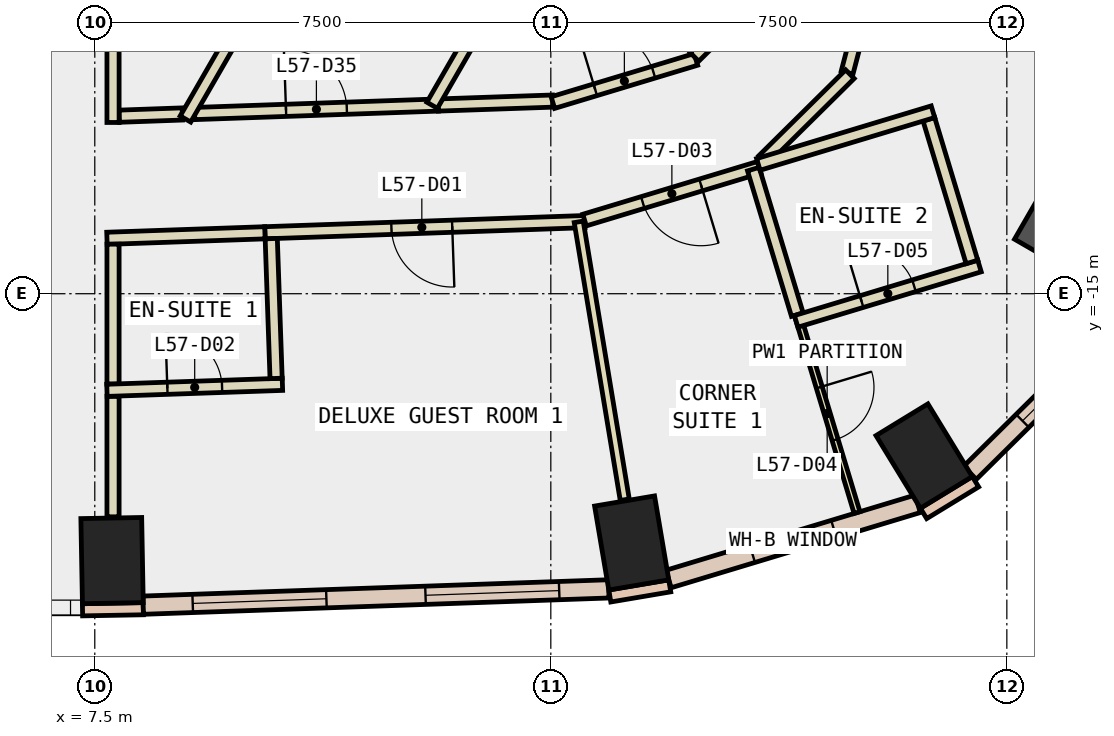
"""IFC4 building model, lengths in metres.
Left out: names, types, materials, properties, quantities, classifications, styles, units other than length and angle.
Written with IfcOpenShell. Run it as: python <this file> out.ifc"""

import sys

from ifc_helpers import new_model, si_unit, direction, frame, frame_2d, origin, origin_2d, place, context, subcontext, project, spatial, rectangle, extrude, element, fill, save


model = new_model("IFC4")
c1 = context("Model", 3, precision=1e-05, world=origin(), true_north=direction((0.0, 1.0)))
c2 = subcontext(c1, "Body", "Model", "MODEL_VIEW")
j1 = project(units=[si_unit("LENGTHUNIT", "METRE"), si_unit("PLANEANGLEUNIT", "RADIAN")], contexts=[c1])
p1 = place(None, origin())
s1 = spatial("IfcSite", under=j1, at=p1, CompositionType="ELEMENT")
p2 = place(p1, origin())
s2 = spatial("IfcBuilding", under=s1, at=p2, CompositionType="ELEMENT")
p3 = place(p2, frame((0.0, 0.0, 252.2)))
s3 = spatial("IfcBuildingStorey", under=s2, at=p3, CompositionType="ELEMENT", Elevation=252.2)
for number, where, z_axis, x_axis in (
    (1, (7.784, -19.389, -0.34), (0.0, 0.0, 1.0), (1.0, 0.018, 0.0)),
    (2, (16.33, -19.099, -0.34), (0.0, 0.0, 1.0), (0.986, 0.167, 0.0)),
    (3, (21.14, -17.67, -0.34), (0.0, 0.0, 1.0), (0.853, 0.521, 0.0)),
):
    element("IfcColumn", number, at=place(p3, frame(where, z_axis=z_axis, x_axis=x_axis)), inside=s3, PredefinedType="COLUMN", context=c2, shape_type="SweptSolid", body=[
        extrude(rectangle(XDim=1.0, YDim=1.4, at=origin_2d()), origin(), (0.0, 0.0, 1.0), 3.6),
    ])
p4 = place(p3, frame((23.856, -13.774, -0.34), z_axis=(0.0, 0.0, 1.0), x_axis=(-0.866025403784, 0.5, 0.0)))
e4 = element("IfcColumn", 4, at=p4, inside=s3, PredefinedType="COLUMN", context=c2, shape_type="SweptSolid", body=[
    extrude(rectangle(XDim=1.8, YDim=1.8, at=origin_2d()), origin(), (0.0, 0.0, 1.0), 3.6),
])
for number, where, z_axis, x_axis in (
    (5, (7.298, -20.198, 0.0), (0.0, 0.0, 1.0), (1.0, 0.018, 0.0)),
    (6, (15.97, -19.971, 0.0), (0.0, 0.0, 1.0), (0.986, 0.167, 0.0)),
):
    element("IfcWall", number, at=place(p3, frame(where, z_axis=z_axis, x_axis=x_axis)), inside=s3, PredefinedType="STANDARD", context=c2, shape_type="SweptSolid", body=[
        extrude(rectangle(XDim=1.0, YDim=0.2, at=frame_2d((0.5, 0.0))), origin(), (0.0, 0.0, 1.0), 3.26),
    ])
p5 = place(p3, frame((21.13, -18.613, 0.0), z_axis=(0.0, 0.0, 1.0), x_axis=(0.853679739553, 0.520798331677, 0.0)))
e7 = element("IfcWall", 7, at=p5, inside=s3, PredefinedType="STANDARD", context=c2, shape_type="SweptSolid", body=[
    extrude(rectangle(XDim=1.0, YDim=0.2, at=frame_2d((0.5, 0.0))), origin(), (0.0, 0.0, 1.0), 3.26),
])
p6 = place(p3, frame((8.296, -20.122, 0.0), z_axis=(0.0, 0.0, 1.0), x_axis=(0.999387577449, 0.034992428331, 0.0)))
e8 = element("IfcWall", 8, at=p6, inside=s3, PredefinedType="STANDARD", context=c2, shape_type="SweptSolid", body=[
    extrude(rectangle(XDim=7.661, YDim=0.3, at=frame_2d((3.83, 0.0))), origin(), (0.0, 0.0, 1.0), 3.26),
])
p7 = place(p6, frame((0.815, 0.0, 0.9)))
e9 = element("IfcOpeningElement", 9, at=p7, cuts=e8, PredefinedType="OPENING", context=c2, shape_type="SweptSolid", body=[
    extrude(rectangle(XDim=2.2, YDim=2.0, at=frame_2d((1.1, 1.0))), frame((0.0, 0.16, 0.0), z_axis=(0.0, -1.0, 0.0), x_axis=(1.0, 0.0, 0.0)), (0.0, 0.0, 1.0), 0.32),
])
p8 = place(p6, frame((4.646, 0.0, 0.9)))
e10 = element("IfcOpeningElement", 10, at=p8, cuts=e8, PredefinedType="OPENING", context=c2, shape_type="SweptSolid", body=[
    extrude(rectangle(XDim=2.2, YDim=2.0, at=frame_2d((1.1, 1.0))), frame((0.0, 0.16, 0.0), z_axis=(0.0, -1.0, 0.0), x_axis=(1.0, 0.0, 0.0)), (0.0, 0.0, 1.0), 0.32),
])
p9 = place(p3, frame((16.936, -19.692, 0.0), z_axis=(0.0, 0.0, 1.0), x_axis=(0.957346168713, 0.288943442997, 0.0)))
e11 = element("IfcWall", 11, at=p9, inside=s3, PredefinedType="STANDARD", context=c2, shape_type="SweptSolid", body=[
    extrude(rectangle(XDim=4.281, YDim=0.3, at=frame_2d((2.14, 0.0))), origin(), (0.0, 0.0, 1.0), 3.26),
])
p10 = place(p9, frame((1.44, 0.0, 0.9)))
e12 = element("IfcOpeningElement", 12, at=p10, cuts=e11, PredefinedType="OPENING", context=c2, shape_type="SweptSolid", body=[
    extrude(rectangle(XDim=1.4, YDim=2.0, at=frame_2d((0.7, 1.0))), frame((0.0, 0.16, 0.0), z_axis=(0.0, -1.0, 0.0), x_axis=(1.0, 0.0, 0.0)), (0.0, 0.0, 1.0), 0.32),
])
p11 = place(p3, frame((21.893, -17.946, 0.0), z_axis=(0.0, 0.0, 1.0), x_axis=(0.71110935557, 0.703081420904, 0.0)))
e13 = element("IfcWall", 13, at=p11, inside=s3, PredefinedType="STANDARD", context=c2, shape_type="SweptSolid", body=[
    extrude(rectangle(XDim=3.832, YDim=0.3, at=frame_2d((1.916, 0.0))), origin(), (0.0, 0.0, 1.0), 3.26),
])
p12 = place(p11, frame((1.216, 0.0, 0.9)))
e14 = element("IfcOpeningElement", 14, at=p12, cuts=e13, PredefinedType="OPENING", context=c2, shape_type="SweptSolid", body=[
    extrude(rectangle(XDim=1.4, YDim=2.0, at=frame_2d((0.7, 1.0))), frame((0.0, 0.16, 0.0), z_axis=(0.0, -1.0, 0.0), x_axis=(1.0, 0.0, 0.0)), (0.0, 0.0, 1.0), 0.32),
])
p13 = place(p3, frame((7.9, -12.081, 0.0), z_axis=(0.0, 0.0, 1.0), x_axis=(0.999365240621, 0.035624652105, 0.0)))
e15 = element("IfcWall", 15, at=p13, inside=s3, PredefinedType="PARTITIONING", context=c2, shape_type="SweptSolid", body=[
    extrude(rectangle(XDim=1.042, YDim=0.2, at=frame_2d((0.521, 0.0))), origin(), (0.0, 0.0, 1.0), 3.26),
])
p14 = place(p3, frame((9.141, -12.037, 0.0), z_axis=(0.0, 0.0, 1.0), x_axis=(0.999388955878, 0.034953038062, 0.0)))
e16 = element("IfcWall", 16, at=p14, inside=s3, PredefinedType="PARTITIONING", context=c2, shape_type="SweptSolid", body=[
    extrude(rectangle(XDim=4.009, YDim=0.2, at=frame_2d((2.005, 0.0))), origin(), (0.0, 0.0, 1.0), 3.26),
])
p15 = place(p14, frame((1.505, 0.0, 0.0)))
e17 = element("IfcOpeningElement", 17, at=p15, cuts=e16, PredefinedType="OPENING", context=c2, shape_type="SweptSolid", body=[
    extrude(rectangle(XDim=1.0, YDim=2.1, at=frame_2d((0.5, 1.05))), frame((0.0, 0.11, 0.0), z_axis=(0.0, -1.0, 0.0), x_axis=(1.0, 0.0, 0.0)), (0.0, 0.0, 1.0), 0.22),
])
p16 = place(p3, frame((13.148, -11.897, 0.0), z_axis=(0.0, 0.0, 1.0), x_axis=(0.999405229262, 0.034484601243, 0.0)))
e18 = element("IfcWall", 18, at=p16, inside=s3, PredefinedType="PARTITIONING", context=c2, shape_type="SweptSolid", body=[
    extrude(rectangle(XDim=1.883, YDim=0.2, at=frame_2d((0.942, 0.0))), origin(), (0.0, 0.0, 1.0), 3.26),
])
p17 = place(p3, frame((15.034, -11.857, 0.0), z_axis=(0.0, 0.0, 1.0), x_axis=(0.957338084933, 0.288970225346, 0.0)))
e19 = element("IfcWall", 19, at=p17, inside=s3, PredefinedType="PARTITIONING", context=c2, shape_type="SweptSolid", body=[
    extrude(rectangle(XDim=2.457, YDim=0.2, at=frame_2d((1.229, 0.0))), origin(), (0.0, 0.0, 1.0), 3.26),
])
p18 = place(p17, frame((0.728, 0.0, 0.0)))
e20 = element("IfcOpeningElement", 20, at=p18, cuts=e19, PredefinedType="OPENING", context=c2, shape_type="SweptSolid", body=[
    extrude(rectangle(XDim=1.0, YDim=2.1, at=frame_2d((0.5, 1.05))), frame((0.0, 0.11, 0.0), z_axis=(0.0, -1.0, 0.0), x_axis=(1.0, 0.0, 0.0)), (0.0, 0.0, 1.0), 0.22),
])
p19 = place(p3, frame((17.362, -11.106, 0.0), z_axis=(0.0, 0.0, 1.0), x_axis=(0.710859741153, 0.703333795866, 0.0)))
e21 = element("IfcWall", 21, at=p19, inside=s3, PredefinedType="PARTITIONING", context=c2, shape_type="SweptSolid", body=[
    extrude(rectangle(XDim=1.071, YDim=0.2, at=frame_2d((0.535, 0.0))), origin(), (0.0, 0.0, 1.0), 3.26),
])
p20 = place(p3, frame((15.559, -13.814, 0.0), z_axis=(0.0, 0.0, 1.0), x_axis=(-0.999388410674, -0.034968623214, 0.0)))
e22 = element("IfcWall", 22, at=p20, inside=s3, PredefinedType="PARTITIONING", context=c2, shape_type="SweptSolid", body=[
    extrude(rectangle(XDim=5.264, YDim=0.2, at=frame_2d((2.632, 0.0))), origin(), (0.0, 0.0, 1.0), 3.26),
])
p21 = place(p20, frame((2.182, 0.0, 0.0)))
e23 = element("IfcOpeningElement", 23, at=p21, cuts=e22, PredefinedType="OPENING", context=c2, shape_type="SweptSolid", body=[
    extrude(rectangle(XDim=1.0, YDim=2.1, at=frame_2d((0.5, 1.05))), frame((0.0, 0.11, 0.0), z_axis=(0.0, -1.0, 0.0), x_axis=(1.0, 0.0, 0.0)), (0.0, 0.0, 1.0), 0.22),
])
p22 = place(p3, frame((10.298, -13.998, 0.0), z_axis=(0.0, 0.0, 1.0), x_axis=(-0.999386321032, -0.035028293342, 0.0)))
e24 = element("IfcWall", 24, at=p22, inside=s3, PredefinedType="PARTITIONING", context=c2, shape_type="SweptSolid", body=[
    extrude(rectangle(XDim=2.6, YDim=0.2, at=frame_2d((1.3, 0.0))), origin(), (0.0, 0.0, 1.0), 3.26),
])
p23 = place(p3, frame((18.427, -12.922, 0.0), z_axis=(0.0, 0.0, 1.0), x_axis=(-0.957336631432, -0.288975040651, 0.0)))
e25 = element("IfcWall", 25, at=p23, inside=s3, PredefinedType="PARTITIONING", context=c2, shape_type="SweptSolid", body=[
    extrude(rectangle(XDim=3.0, YDim=0.2, at=frame_2d((1.5, 0.0))), origin(), (0.0, 0.0, 1.0), 3.26),
])
p24 = place(p23, frame((1.0, 0.0, 0.0)))
e26 = element("IfcOpeningElement", 26, at=p24, cuts=e25, PredefinedType="OPENING", context=c2, shape_type="SweptSolid", body=[
    extrude(rectangle(XDim=1.0, YDim=2.1, at=frame_2d((0.5, 1.05))), frame((0.0, 0.11, 0.0), z_axis=(0.0, -1.0, 0.0), x_axis=(1.0, 0.0, 0.0)), (0.0, 0.0, 1.0), 0.22),
])
p25 = place(p3, frame((20.327, -9.629, 0.0), z_axis=(0.0, 0.0, 1.0), x_axis=(-0.253192482031, -0.967415922467, 0.0)))
e27 = element("IfcWall", 27, at=p25, inside=s3, PredefinedType="PARTITIONING", context=c2, shape_type="SweptSolid", body=[
    extrude(rectangle(XDim=1.792, YDim=0.2, at=frame_2d((0.896, 0.0))), origin(), (0.0, 0.0, 1.0), 3.26),
])
p26 = place(p3, frame((19.919, -11.39, 0.0), z_axis=(0.0, 0.0, 1.0), x_axis=(-0.71104667794, -0.70314480855, 0.0)))
e28 = element("IfcWall", 28, at=p26, inside=s3, PredefinedType="PARTITIONING", context=c2, shape_type="SweptSolid", body=[
    extrude(rectangle(XDim=2.008, YDim=0.2, at=frame_2d((1.004, 0.0))), origin(), (0.0, 0.0, 1.0), 3.26),
])
p27 = place(p3, frame((7.8, -7.499, 0.0), z_axis=(0.0, 0.0, 1.0), x_axis=(0.0, -1.0, 0.0)))
e29 = element("IfcWall", 29, at=p27, inside=s3, PredefinedType="PARTITIONING", context=c2, shape_type="SweptSolid", body=[
    extrude(rectangle(XDim=4.685, YDim=0.2, at=frame_2d((2.343, 0.0))), origin(), (0.0, 0.0, 1.0), 3.26),
])
p28 = place(p27, frame((1.842, 0.0, 0.0)))
e30 = element("IfcOpeningElement", 30, at=p28, cuts=e29, PredefinedType="OPENING", context=c2, shape_type="SweptSolid", body=[
    extrude(rectangle(XDim=1.0, YDim=2.1, at=frame_2d((0.5, 1.05))), frame((0.0, 0.11, 0.0), z_axis=(0.0, -1.0, 0.0), x_axis=(1.0, 0.0, 0.0)), (0.0, 0.0, 1.0), 0.22),
])
p29 = place(p3, frame((7.8, -16.686, 0.0), z_axis=(0.0, 0.0, 1.0), x_axis=(0.0, -1.0, 0.0)))
e31 = element("IfcWall", 31, at=p29, inside=s3, PredefinedType="PARTITIONING", context=c2, shape_type="SweptSolid", body=[
    extrude(rectangle(XDim=1.983, YDim=0.2, at=frame_2d((0.991, 0.0))), origin(), (0.0, 0.0, 1.0), 3.26),
])
p30 = place(p3, frame((7.8, -14.185, 0.0), z_axis=(0.0, 0.0, 1.0), x_axis=(0.0, -1.0, 0.0)))
e32 = element("IfcWall", 32, at=p30, inside=s3, PredefinedType="PARTITIONING", context=c2, shape_type="SweptSolid", body=[
    extrude(rectangle(XDim=2.301, YDim=0.2, at=frame_2d((1.15, 0.0))), origin(), (0.0, 0.0, 1.0), 3.26),
])
p31 = place(p3, frame((11.794, -7.271, 0.0), z_axis=(0.0, 0.0, 1.0), x_axis=(-0.499918457185, -0.866072477433, 0.0)))
e33 = element("IfcWall", 33, at=p31, inside=s3, PredefinedType="PARTITIONING", context=c2, shape_type="SweptSolid", body=[
    extrude(rectangle(XDim=5.607, YDim=0.2, at=frame_2d((2.803, 0.0))), origin(), (0.0, 0.0, 1.0), 3.26),
])
p32 = place(p3, frame((14.739, -8.972, 0.0), z_axis=(0.0, 0.0, 1.0), x_axis=(-0.499974489635, -0.8660401317, 0.0)))
e34 = element("IfcWall", 34, at=p32, inside=s3, PredefinedType="PARTITIONING", context=c2, shape_type="SweptSolid", body=[
    extrude(rectangle(XDim=3.382, YDim=0.2, at=frame_2d((1.691, 0.0))), origin(), (0.0, 0.0, 1.0), 3.26),
])
p33 = place(p3, frame((7.7, -16.589, 0.0), z_axis=(0.0, 0.0, 1.0), x_axis=(0.999410709261, 0.034325416459, 0.0)))
e35 = element("IfcWall", 35, at=p33, inside=s3, PredefinedType="PARTITIONING", context=c2, shape_type="SweptSolid", body=[
    extrude(rectangle(XDim=2.888, YDim=0.2, at=frame_2d((1.444, 0.0))), origin(), (0.0, 0.0, 1.0), 3.26),
])
p34 = place(p33, frame((0.994, 0.0, 0.0)))
e36 = element("IfcOpeningElement", 36, at=p34, cuts=e35, PredefinedType="OPENING", context=c2, shape_type="SweptSolid", body=[
    extrude(rectangle(XDim=0.9, YDim=2.1, at=frame_2d((0.45, 1.05))), frame((0.0, 0.11, 0.0), z_axis=(0.0, -1.0, 0.0), x_axis=(1.0, 0.0, 0.0)), (0.0, 0.0, 1.0), 0.22),
])
p35 = place(p3, frame((10.482, -16.393, 0.0), z_axis=(0.0, 0.0, 1.0), x_axis=(-0.034703518322, 0.999397651496, 0.0)))
e37 = element("IfcWall", 37, at=p35, inside=s3, PredefinedType="PARTITIONING", context=c2, shape_type="SweptSolid", body=[
    extrude(rectangle(XDim=2.301, YDim=0.2, at=frame_2d((1.15, 0.0))), origin(), (0.0, 0.0, 1.0), 3.26),
])
p36 = place(p3, frame((15.459, -13.818, 0.0), z_axis=(0.0, 0.0, 1.0), x_axis=(0.163441652939, -0.986553002167, 0.0)))
e38 = element("IfcWall", 38, at=p36, inside=s3, PredefinedType="PARTITIONING", context=c2, shape_type="SweptSolid", body=[
    extrude(rectangle(XDim=4.632, YDim=0.15, at=frame_2d((2.316, 0.0))), origin(), (0.0, 0.0, 1.0), 3.26),
])
p37 = place(p3, frame((19.054, -15.344, 0.0), z_axis=(0.0, 0.0, 1.0), x_axis=(0.288803435252, -0.957388414274, 0.0)))
e39 = element("IfcWall", 39, at=p37, inside=s3, PredefinedType="PARTITIONING", context=c2, shape_type="SweptSolid", body=[
    extrude(rectangle(XDim=3.4, YDim=0.1, at=frame_2d((1.7, 0.0))), origin(), (0.0, 0.0, 1.0), 3.26),
])
p38 = place(p37, frame((1.25, 0.0, 0.0)))
e40 = element("IfcOpeningElement", 40, at=p38, cuts=e39, PredefinedType="OPENING", context=c2, shape_type="SweptSolid", body=[
    extrude(rectangle(XDim=0.9, YDim=2.1, at=frame_2d((0.45, 1.05))), frame((0.0, 0.06, 0.0), z_axis=(0.0, -1.0, 0.0), x_axis=(1.0, 0.0, 0.0)), (0.0, 0.0, 1.0), 0.12),
])
p39 = place(p3, frame((18.331, -12.951, 0.0), z_axis=(0.0, 0.0, 1.0), x_axis=(0.289175152117, -0.957276204341, 0.0)))
e41 = element("IfcWall", 41, at=p39, inside=s3, PredefinedType="PARTITIONING", context=c2, shape_type="SweptSolid", body=[
    extrude(rectangle(XDim=2.5, YDim=0.2, at=frame_2d((1.25, 0.0))), origin(), (0.0, 0.0, 1.0), 3.26),
])
p40 = place(p3, frame((19.035, -15.455, 0.0), z_axis=(0.0, 0.0, 1.0), x_axis=(0.957248369253, 0.28926728049, 0.0)))
e42 = element("IfcWall", 42, at=p40, inside=s3, PredefinedType="PARTITIONING", context=c2, shape_type="SweptSolid", body=[
    extrude(rectangle(XDim=3.15, YDim=0.2, at=frame_2d((1.575, 0.0))), origin(), (0.0, 0.0, 1.0), 3.26),
])
p41 = place(p40, frame((1.125, 0.0, 0.0)))
e43 = element("IfcOpeningElement", 43, at=p41, cuts=e42, PredefinedType="OPENING", context=c2, shape_type="SweptSolid", body=[
    extrude(rectangle(XDim=0.9, YDim=2.1, at=frame_2d((0.45, 1.05))), frame((0.0, 0.11, 0.0), z_axis=(0.0, -1.0, 0.0), x_axis=(1.0, 0.0, 0.0)), (0.0, 0.0, 1.0), 0.22),
])
p42 = place(p3, frame((21.926, -14.478, 0.0), z_axis=(0.0, 0.0, 1.0), x_axis=(-0.288928787246, 0.957350591947, 0.0)))
e44 = element("IfcWall", 44, at=p42, inside=s3, PredefinedType="PARTITIONING", context=c2, shape_type="SweptSolid", body=[
    extrude(rectangle(XDim=2.45, YDim=0.2, at=frame_2d((1.225, 0.0))), origin(), (0.0, 0.0, 1.0), 3.26),
])
p43 = place(p3, frame((21.285, -12.007, 0.0), z_axis=(0.0, 0.0, 1.0), x_axis=(-0.957329834998, -0.288997555392, 0.0)))
e45 = element("IfcWall", 45, at=p43, inside=s3, PredefinedType="PARTITIONING", context=c2, shape_type="SweptSolid", body=[
    extrude(rectangle(XDim=3.0, YDim=0.2, at=frame_2d((1.5, 0.0))), origin(), (0.0, 0.0, 1.0), 3.26),
])
p44 = place(p7, origin())
e46 = element("IfcWindow", 46, at=p44, inside=s3, PartitioningType="SINGLE_PANEL", PredefinedType="WINDOW", context=c2, shape_type="SweptSolid", body=[
    extrude(rectangle(XDim=2.2, YDim=2.0, at=frame_2d((1.1, 1.0))), frame((0.0, 0.03, 0.0), z_axis=(0.0, -1.0, 0.0), x_axis=(1.0, 0.0, 0.0)), (0.0, 0.0, 1.0), 0.06),
])
fill(e9, e46)
p45 = place(p8, origin())
e47 = element("IfcWindow", 47, at=p45, inside=s3, PartitioningType="SINGLE_PANEL", PredefinedType="WINDOW", context=c2, shape_type="SweptSolid", body=[
    extrude(rectangle(XDim=2.2, YDim=2.0, at=frame_2d((1.1, 1.0))), frame((0.0, 0.03, 0.0), z_axis=(0.0, -1.0, 0.0), x_axis=(1.0, 0.0, 0.0)), (0.0, 0.0, 1.0), 0.06),
])
fill(e10, e47)
p46 = place(p10, origin())
e48 = element("IfcWindow", 48, at=p46, inside=s3, PartitioningType="SINGLE_PANEL", PredefinedType="WINDOW", context=c2, shape_type="SweptSolid", body=[
    extrude(rectangle(XDim=1.4, YDim=2.0, at=frame_2d((0.7, 1.0))), frame((0.0, 0.03, 0.0), z_axis=(0.0, -1.0, 0.0), x_axis=(1.0, 0.0, 0.0)), (0.0, 0.0, 1.0), 0.06),
])
fill(e12, e48)
p47 = place(p12, origin())
e49 = element("IfcWindow", 49, at=p47, inside=s3, PartitioningType="SINGLE_PANEL", PredefinedType="WINDOW", context=c2, shape_type="SweptSolid", body=[
    extrude(rectangle(XDim=1.4, YDim=2.0, at=frame_2d((0.7, 1.0))), frame((0.0, 0.03, 0.0), z_axis=(0.0, -1.0, 0.0), x_axis=(1.0, 0.0, 0.0)), (0.0, 0.0, 1.0), 0.06),
])
fill(e14, e49)
p48 = place(p21, origin())
e50 = element("IfcDoor", 50, at=p48, inside=s3, OperationType="SINGLE_SWING_LEFT", PredefinedType="DOOR", context=c2, shape_type="SweptSolid", body=[
    extrude(rectangle(XDim=1.0, YDim=2.1, at=frame_2d((0.5, 1.05))), frame((0.0, 0.025, 0.0), z_axis=(0.0, -1.0, 0.0), x_axis=(1.0, 0.0, 0.0)), (0.0, 0.0, 1.0), 0.05),
])
fill(e23, e50)
p49 = place(p34, origin())
e51 = element("IfcDoor", 51, at=p49, inside=s3, OperationType="SINGLE_SWING_LEFT", PredefinedType="DOOR", context=c2, shape_type="SweptSolid", body=[
    extrude(rectangle(XDim=0.9, YDim=2.1, at=frame_2d((0.45, 1.05))), frame((0.0, 0.025, 0.0), z_axis=(0.0, -1.0, 0.0), x_axis=(1.0, 0.0, 0.0)), (0.0, 0.0, 1.0), 0.05),
])
fill(e36, e51)
p50 = place(p24, origin())
e52 = element("IfcDoor", 52, at=p50, inside=s3, OperationType="SINGLE_SWING_LEFT", PredefinedType="DOOR", context=c2, shape_type="SweptSolid", body=[
    extrude(rectangle(XDim=1.0, YDim=2.1, at=frame_2d((0.5, 1.05))), frame((0.0, 0.025, 0.0), z_axis=(0.0, -1.0, 0.0), x_axis=(1.0, 0.0, 0.0)), (0.0, 0.0, 1.0), 0.05),
])
fill(e26, e52)
p51 = place(p38, origin())
e53 = element("IfcDoor", 53, at=p51, inside=s3, OperationType="SINGLE_SWING_RIGHT", PredefinedType="DOOR", context=c2, shape_type="SweptSolid", body=[
    extrude(rectangle(XDim=0.9, YDim=2.1, at=frame_2d((0.45, 1.05))), frame((0.0, 0.025, 0.0), z_axis=(0.0, -1.0, 0.0), x_axis=(1.0, 0.0, 0.0)), (0.0, 0.0, 1.0), 0.05),
])
fill(e40, e53)
p52 = place(p41, origin())
e54 = element("IfcDoor", 54, at=p52, inside=s3, OperationType="SINGLE_SWING_LEFT", PredefinedType="DOOR", context=c2, shape_type="SweptSolid", body=[
    extrude(rectangle(XDim=0.9, YDim=2.1, at=frame_2d((0.45, 1.05))), frame((0.0, 0.025, 0.0), z_axis=(0.0, -1.0, 0.0), x_axis=(1.0, 0.0, 0.0)), (0.0, 0.0, 1.0), 0.05),
])
fill(e43, e54)
p53 = place(p15, origin())
e55 = element("IfcDoor", 55, at=p53, inside=s3, OperationType="SINGLE_SWING_LEFT", PredefinedType="DOOR", context=c2, shape_type="SweptSolid", body=[
    extrude(rectangle(XDim=1.0, YDim=2.1, at=frame_2d((0.5, 1.05))), frame((0.0, 0.025, 0.0), z_axis=(0.0, -1.0, 0.0), x_axis=(1.0, 0.0, 0.0)), (0.0, 0.0, 1.0), 0.05),
])
fill(e17, e55)
p54 = place(p18, origin())
e56 = element("IfcDoor", 56, at=p54, inside=s3, OperationType="SINGLE_SWING_LEFT", PredefinedType="DOOR", context=c2, shape_type="SweptSolid", body=[
    extrude(rectangle(XDim=1.0, YDim=2.1, at=frame_2d((0.5, 1.05))), frame((0.0, 0.025, 0.0), z_axis=(0.0, -1.0, 0.0), x_axis=(1.0, 0.0, 0.0)), (0.0, 0.0, 1.0), 0.05),
])
fill(e20, e56)
save(model, sys.argv[1])
